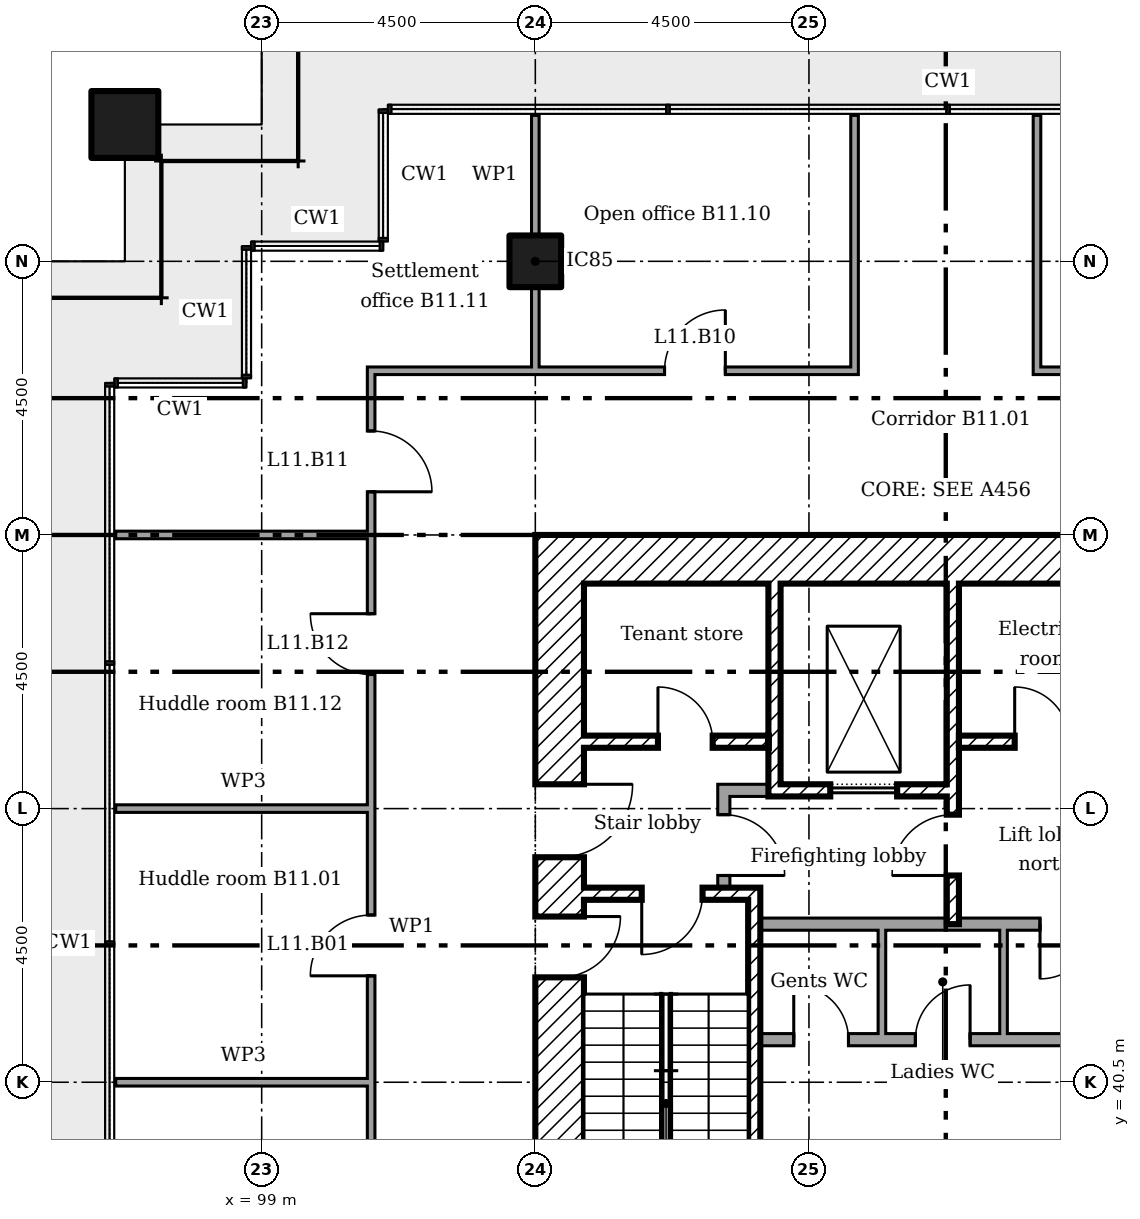
"""IFC4 building model, lengths in metres.
Left out: names, types, materials, properties, quantities, classifications, styles, units other than length and angle.
Written with IfcOpenShell. Run it as: python <this file> out.ifc"""

import sys

from ifc_helpers import new_model, si_unit, direction, frame, frame_2d, origin, origin_2d, place, context, subcontext, project, spatial, rectangle, extrude, element, fill, save


model = new_model("IFC4")
c1 = context("Model", 3, precision=1e-05, world=origin(), true_north=direction((0.0, 1.0)))
c2 = subcontext(c1, "Body", "Model", "MODEL_VIEW")
j1 = project(units=[si_unit("LENGTHUNIT", "METRE"), si_unit("PLANEANGLEUNIT", "RADIAN")], contexts=[c1])
p1 = place(None, origin())
s1 = spatial("IfcSite", under=j1, at=p1, CompositionType="ELEMENT")
p2 = place(p1, origin())
s2 = spatial("IfcBuilding", under=s1, at=p2, CompositionType="ELEMENT")
p3 = place(p2, frame((0.0, 0.0, 51.0)))
s3 = spatial("IfcBuildingStorey", under=s2, at=p3, CompositionType="ELEMENT", Elevation=51.0)
p4 = place(p3, frame((96.75, 56.25, 0.0)))
e1 = element("IfcColumn", 1, at=p4, inside=s3, PredefinedType="COLUMN", context=c2, shape_type="SweptSolid", body=[
    extrude(rectangle(XDim=1.1, YDim=1.1, at=origin_2d()), origin(), (0.0, 0.0, 1.0), 3.6),
])
p5 = place(p3, frame((103.5, 54.0, 0.0)))
e2 = element("IfcColumn", 2, at=p5, inside=s3, PredefinedType="COLUMN", context=c2, shape_type="SweptSolid", body=[
    extrude(rectangle(XDim=0.85, YDim=0.85, at=origin_2d()), origin(), (0.0, 0.0, 1.0), 3.6),
])
p6 = place(p3, frame((104.3, 49.1, 0.0)))
e3 = element("IfcWall", 3, at=p6, inside=s3, PredefinedType="SHEAR", context=c2, shape_type="SweptSolid", body=[
    extrude(rectangle(XDim=11.9, YDim=0.8, at=frame_2d((5.95, 0.0))), origin(), (0.0, 0.0, 1.0), 3.35),
])
p7 = place(p3, frame((103.9, 36.0, 0.0), z_axis=(0.0, 0.0, 1.0), x_axis=(0.0, 1.0, 0.0)))
e4 = element("IfcWall", 4, at=p7, inside=s3, PredefinedType="SHEAR", context=c2, shape_type="SweptSolid", body=[
    extrude(rectangle(XDim=13.5, YDim=0.8, at=frame_2d((6.75, 0.0))), origin(), (0.0, 0.0, 1.0), 3.35),
])
p8 = place(p7, frame((8.2, 0.0, 0.0)))
e5 = element("IfcOpeningElement", 5, at=p8, cuts=e4, PredefinedType="OPENING", context=c2, shape_type="SweptSolid", body=[
    extrude(rectangle(XDim=1.2, YDim=2.1, at=frame_2d((0.6, 1.05))), frame((0.0, 0.41, 0.0), z_axis=(0.0, -1.0, 0.0), x_axis=(1.0, 0.0, 0.0)), (0.0, 0.0, 1.0), 0.82),
])
p9 = place(p7, frame((6.225, 0.0, 0.0)))
e6 = element("IfcOpeningElement", 6, at=p9, cuts=e4, PredefinedType="OPENING", context=c2, shape_type="SweptSolid", body=[
    extrude(rectangle(XDim=1.0, YDim=2.1, at=frame_2d((0.5, 1.05))), frame((0.0, 0.41, 0.0), z_axis=(0.0, -1.0, 0.0), x_axis=(1.0, 0.0, 0.0)), (0.0, 0.0, 1.0), 0.82),
])
p10 = place(p3, frame((107.433, 48.7, 0.0), z_axis=(0.0, 0.0, 1.0), x_axis=(0.0, -1.0, 0.0)))
e7 = element("IfcWall", 7, at=p10, inside=s3, PredefinedType="SHEAR", context=c2, shape_type="SweptSolid", body=[
    extrude(rectangle(XDim=3.5, YDim=0.2, at=frame_2d((1.75, 0.0))), origin(), (0.0, 0.0, 1.0), 3.35),
])
p11 = place(p3, frame((110.367, 48.7, 0.0), z_axis=(0.0, 0.0, 1.0), x_axis=(0.0, -1.0, 0.0)))
e8 = element("IfcWall", 8, at=p11, inside=s3, PredefinedType="SHEAR", context=c2, shape_type="SweptSolid", body=[
    extrude(rectangle(XDim=5.6, YDim=0.2, at=frame_2d((2.8, 0.0))), origin(), (0.0, 0.0, 1.0), 3.35),
])
p12 = place(p11, frame((3.8, 0.0, 0.0)))
e9 = element("IfcOpeningElement", 9, at=p12, cuts=e8, PredefinedType="OPENING", context=c2, shape_type="SweptSolid", body=[
    extrude(rectangle(XDim=1.0, YDim=2.1, at=frame_2d((0.5, 1.05))), frame((0.0, 0.11, 0.0), z_axis=(0.0, -1.0, 0.0), x_axis=(1.0, 0.0, 0.0)), (0.0, 0.0, 1.0), 0.22),
])
p13 = place(p3, frame((106.5, 45.3, 0.0)))
e10 = element("IfcWall", 10, at=p13, inside=s3, PredefinedType="PARTITIONING", context=c2, shape_type="SweptSolid", body=[
    extrude(rectangle(XDim=0.833, YDim=0.2, at=frame_2d((0.417, 0.0))), origin(), (0.0, 0.0, 1.0), 3.35),
])
p14 = place(p3, frame((106.6, 43.7, 0.0), z_axis=(0.0, 0.0, 1.0), x_axis=(0.0, 1.0, 0.0)))
e11 = element("IfcWall", 11, at=p14, inside=s3, PredefinedType="PARTITIONING", context=c2, shape_type="SweptSolid", body=[
    extrude(rectangle(XDim=1.5, YDim=0.2, at=frame_2d((0.75, 0.0))), origin(), (0.0, 0.0, 1.0), 3.35),
])
p15 = place(p14, frame((0.2, 0.0, 0.0)))
e12 = element("IfcOpeningElement", 12, at=p15, cuts=e11, PredefinedType="OPENING", context=c2, shape_type="SweptSolid", body=[
    extrude(rectangle(XDim=1.0, YDim=2.1, at=frame_2d((0.5, 1.05))), frame((0.0, 0.11, 0.0), z_axis=(0.0, -1.0, 0.0), x_axis=(1.0, 0.0, 0.0)), (0.0, 0.0, 1.0), 0.22),
])
p16 = place(p3, frame((104.3, 46.1, 0.0)))
e13 = element("IfcWall", 13, at=p16, inside=s3, PredefinedType="SHEAR", context=c2, shape_type="SweptSolid", body=[
    extrude(rectangle(XDim=3.033, YDim=0.2, at=frame_2d((1.517, 0.0))), origin(), (0.0, 0.0, 1.0), 3.35),
])
p17 = place(p16, frame((1.217, 0.0, 0.0)))
e14 = element("IfcOpeningElement", 14, at=p17, cuts=e13, PredefinedType="OPENING", context=c2, shape_type="SweptSolid", body=[
    extrude(rectangle(XDim=0.9, YDim=2.1, at=frame_2d((0.45, 1.05))), frame((0.0, 0.11, 0.0), z_axis=(0.0, -1.0, 0.0), x_axis=(1.0, 0.0, 0.0)), (0.0, 0.0, 1.0), 0.22),
])
p18 = place(p3, frame((110.467, 46.1, 0.0)))
e15 = element("IfcWall", 15, at=p18, inside=s3, PredefinedType="SHEAR", context=c2, shape_type="SweptSolid", body=[
    extrude(rectangle(XDim=2.833, YDim=0.2, at=frame_2d((1.417, 0.0))), origin(), (0.0, 0.0, 1.0), 3.35),
])
p19 = place(p18, frame((0.917, 0.0, 0.0)))
e16 = element("IfcOpeningElement", 16, at=p19, cuts=e15, PredefinedType="OPENING", context=c2, shape_type="SweptSolid", body=[
    extrude(rectangle(XDim=0.9, YDim=2.1, at=frame_2d((0.45, 1.05))), frame((0.0, 0.11, 0.0), z_axis=(0.0, -1.0, 0.0), x_axis=(1.0, 0.0, 0.0)), (0.0, 0.0, 1.0), 0.22),
])
p20 = place(p3, frame((107.533, 45.3, 0.0)))
e17 = element("IfcWall", 17, at=p20, inside=s3, PredefinedType="SHEAR", context=c2, shape_type="SweptSolid", body=[
    extrude(rectangle(XDim=2.733, YDim=0.2, at=frame_2d((1.367, 0.0))), origin(), (0.0, 0.0, 1.0), 3.35),
])
p21 = place(p20, frame((0.817, 0.0, 0.0)))
e18 = element("IfcOpeningElement", 18, at=p21, cuts=e17, PredefinedType="OPENING", context=c2, shape_type="SweptSolid", body=[
    extrude(rectangle(XDim=1.1, YDim=2.1, at=frame_2d((0.55, 1.05))), frame((0.0, 0.11, 0.0), z_axis=(0.0, -1.0, 0.0), x_axis=(1.0, 0.0, 0.0)), (0.0, 0.0, 1.0), 0.22),
])
p22 = place(p3, frame((107.1, 36.8, 0.0), z_axis=(0.0, 0.0, 1.0), x_axis=(0.0, 1.0, 0.0)))
e19 = element("IfcWall", 19, at=p22, inside=s3, PredefinedType="SHEAR", context=c2, shape_type="SweptSolid", body=[
    extrude(rectangle(XDim=6.9, YDim=0.2, at=frame_2d((3.45, 0.0))), origin(), (0.0, 0.0, 1.0), 3.35),
])
p23 = place(p3, frame((104.3, 43.6, 0.0)))
e20 = element("IfcWall", 20, at=p23, inside=s3, PredefinedType="SHEAR", context=c2, shape_type="SweptSolid", body=[
    extrude(rectangle(XDim=2.7, YDim=0.2, at=frame_2d((1.35, 0.0))), origin(), (0.0, 0.0, 1.0), 3.35),
])
p24 = place(p23, frame((0.95, 0.0, 0.0)))
e21 = element("IfcOpeningElement", 21, at=p24, cuts=e20, PredefinedType="OPENING", context=c2, shape_type="SweptSolid", body=[
    extrude(rectangle(XDim=1.0, YDim=2.1, at=frame_2d((0.5, 1.05))), frame((0.0, 0.11, 0.0), z_axis=(0.0, -1.0, 0.0), x_axis=(1.0, 0.0, 0.0)), (0.0, 0.0, 1.0), 0.22),
])
p25 = place(p3, frame((107.2, 43.1, 0.0)))
e22 = element("IfcWall", 22, at=p25, inside=s3, PredefinedType="PARTITIONING", context=c2, shape_type="SweptSolid", body=[
    extrude(rectangle(XDim=6.1, YDim=0.2, at=frame_2d((3.05, 0.0))), origin(), (0.0, 0.0, 1.0), 3.35),
])
p26 = place(p25, frame((4.6, 0.0, 0.0)))
e23 = element("IfcOpeningElement", 23, at=p26, cuts=e22, PredefinedType="OPENING", context=c2, shape_type="SweptSolid", body=[
    extrude(rectangle(XDim=0.9, YDim=2.1, at=frame_2d((0.45, 1.05))), frame((0.0, 0.11, 0.0), z_axis=(0.0, -1.0, 0.0), x_axis=(1.0, 0.0, 0.0)), (0.0, 0.0, 1.0), 0.22),
])
p27 = place(p3, frame((107.2, 41.2, 0.0)))
e24 = element("IfcWall", 24, at=p27, inside=s3, PredefinedType="PARTITIONING", context=c2, shape_type="SweptSolid", body=[
    extrude(rectangle(XDim=6.1, YDim=0.2, at=frame_2d((3.05, 0.0))), origin(), (0.0, 0.0, 1.0), 3.35),
])
p28 = place(p27, frame((0.55, 0.0, 0.0)))
e25 = element("IfcOpeningElement", 25, at=p28, cuts=e24, PredefinedType="OPENING", context=c2, shape_type="SweptSolid", body=[
    extrude(rectangle(XDim=0.9, YDim=2.1, at=frame_2d((0.45, 1.05))), frame((0.0, 0.11, 0.0), z_axis=(0.0, -1.0, 0.0), x_axis=(1.0, 0.0, 0.0)), (0.0, 0.0, 1.0), 0.22),
])
p29 = place(p27, frame((2.55, 0.0, 0.0)))
e26 = element("IfcOpeningElement", 26, at=p29, cuts=e24, PredefinedType="OPENING", context=c2, shape_type="SweptSolid", body=[
    extrude(rectangle(XDim=0.9, YDim=2.1, at=frame_2d((0.45, 1.05))), frame((0.0, 0.11, 0.0), z_axis=(0.0, -1.0, 0.0), x_axis=(1.0, 0.0, 0.0)), (0.0, 0.0, 1.0), 0.22),
])
for number, where, z_axis, x_axis in (
    (27, (109.2, 41.3, 0.0), (0.0, 0.0, 1.0), (0.0, 1.0, 0.0)),
    (28, (111.2, 41.3, 0.0), (0.0, 0.0, 1.0), (0.0, 1.0, 0.0)),
):
    element("IfcWall", number, at=place(p3, frame(where, z_axis=z_axis, x_axis=x_axis)), inside=s3, PredefinedType="PARTITIONING", context=c2, shape_type="SweptSolid", body=[
        extrude(rectangle(XDim=1.7, YDim=0.125, at=frame_2d((0.85, 0.0))), origin(), (0.0, 0.0, 1.0), 3.35),
    ])
for number, where in (
    (29, (96.6, 40.5, 0.0)),
    (30, (96.6, 45.0, 0.0)),
):
    element("IfcWall", number, at=place(p3, frame(where)), inside=s3, PredefinedType="MOVABLE", context=c2, shape_type="SweptSolid", body=[
        extrude(rectangle(XDim=4.2, YDim=0.125, at=frame_2d((2.1, 0.0))), origin(), (0.0, 0.0, 1.0), 2.851),
    ])
p30 = place(p3, frame((96.6, 49.5, 0.0)))
e31 = element("IfcWall", 31, at=p30, inside=s3, PredefinedType="PARTITIONING", context=c2, shape_type="SweptSolid", body=[
    extrude(rectangle(XDim=4.2, YDim=0.125, at=frame_2d((2.1, 0.0))), origin(), (0.0, 0.0, 1.0), 2.851),
])
p31 = place(p3, frame((100.738, 52.2, 0.0)))
e32 = element("IfcWall", 32, at=p31, inside=s3, PredefinedType="PARTITIONING", context=c2, shape_type="SweptSolid", body=[
    extrude(rectangle(XDim=8.075, YDim=0.125, at=frame_2d((4.038, 0.0))), origin(), (0.0, 0.0, 1.0), 3.45),
])
p32 = place(p31, frame((4.887, 0.0, 0.0)))
e33 = element("IfcOpeningElement", 33, at=p32, cuts=e32, PredefinedType="OPENING", context=c2, shape_type="SweptSolid", body=[
    extrude(rectangle(XDim=1.0, YDim=2.1, at=frame_2d((0.5, 1.05))), frame((0.0, 0.073, 0.0), z_axis=(0.0, -1.0, 0.0), x_axis=(1.0, 0.0, 0.0)), (0.0, 0.0, 1.0), 0.145),
])
p33 = place(p3, frame((111.688, 52.2, 0.0)))
e34 = element("IfcWall", 34, at=p33, inside=s3, PredefinedType="PARTITIONING", context=c2, shape_type="SweptSolid", body=[
    extrude(rectangle(XDim=8.675, YDim=0.125, at=frame_2d((4.337, 0.0))), origin(), (0.0, 0.0, 1.0), 3.45),
])
p34 = place(p33, frame((2.773, 0.0, 0.0)))
e35 = element("IfcOpeningElement", 35, at=p34, cuts=e34, PredefinedType="OPENING", context=c2, shape_type="SweptSolid", body=[
    extrude(rectangle(XDim=1.0, YDim=2.1, at=frame_2d((0.5, 1.05))), frame((0.0, 0.073, 0.0), z_axis=(0.0, -1.0, 0.0), x_axis=(1.0, 0.0, 0.0)), (0.0, 0.0, 1.0), 0.145),
])
p35 = place(p3, frame((100.8, 33.962, 0.0), z_axis=(0.0, 0.0, 1.0), x_axis=(0.0, 1.0, 0.0)))
e36 = element("IfcWall", 36, at=p35, inside=s3, PredefinedType="PARTITIONING", context=c2, shape_type="SweptSolid", body=[
    extrude(rectangle(XDim=18.175, YDim=0.125, at=frame_2d((9.087, 0.0))), origin(), (0.0, 0.0, 1.0), 3.45),
])
p36 = place(p35, frame((8.288, 0.0, 0.0)))
e37 = element("IfcOpeningElement", 37, at=p36, cuts=e36, PredefinedType="OPENING", context=c2, shape_type="SweptSolid", body=[
    extrude(rectangle(XDim=1.0, YDim=2.1, at=frame_2d((0.5, 1.05))), frame((0.0, 0.073, 0.0), z_axis=(0.0, -1.0, 0.0), x_axis=(1.0, 0.0, 0.0)), (0.0, 0.0, 1.0), 0.145),
])
p37 = place(p35, frame((3.333, 0.0, 0.0)))
e38 = element("IfcOpeningElement", 38, at=p37, cuts=e36, PredefinedType="OPENING", context=c2, shape_type="SweptSolid", body=[
    extrude(rectangle(XDim=1.0, YDim=2.1, at=frame_2d((0.5, 1.05))), frame((0.0, 0.073, 0.0), z_axis=(0.0, -1.0, 0.0), x_axis=(1.0, 0.0, 0.0)), (0.0, 0.0, 1.0), 0.145),
])
p38 = place(p35, frame((0.522, 0.0, 0.0)))
e39 = element("IfcOpeningElement", 39, at=p38, cuts=e36, PredefinedType="OPENING", context=c2, shape_type="SweptSolid", body=[
    extrude(rectangle(XDim=1.0, YDim=2.1, at=frame_2d((0.5, 1.05))), frame((0.0, 0.073, 0.0), z_axis=(0.0, -1.0, 0.0), x_axis=(1.0, 0.0, 0.0)), (0.0, 0.0, 1.0), 0.145),
])
p39 = place(p35, frame((16.248, 0.0, 0.0)))
e40 = element("IfcOpeningElement", 40, at=p39, cuts=e36, PredefinedType="OPENING", context=c2, shape_type="SweptSolid", body=[
    extrude(rectangle(XDim=1.0, YDim=2.1, at=frame_2d((0.5, 1.05))), frame((0.0, 0.073, 0.0), z_axis=(0.0, -1.0, 0.0), x_axis=(1.0, 0.0, 0.0)), (0.0, 0.0, 1.0), 0.145),
])
p40 = place(p35, frame((13.242, 0.0, 0.0)))
e41 = element("IfcOpeningElement", 41, at=p40, cuts=e36, PredefinedType="OPENING", context=c2, shape_type="SweptSolid", body=[
    extrude(rectangle(XDim=1.0, YDim=2.1, at=frame_2d((0.5, 1.05))), frame((0.0, 0.073, 0.0), z_axis=(0.0, -1.0, 0.0), x_axis=(1.0, 0.0, 0.0)), (0.0, 0.0, 1.0), 0.145),
])
p41 = place(p3, frame((103.5, 52.2, 0.0), z_axis=(0.0, 0.0, 1.0), x_axis=(0.0, 1.0, 0.0)))
e42 = element("IfcWall", 42, at=p41, inside=s3, PredefinedType="PARTITIONING", context=c2, shape_type="SweptSolid", body=[
    extrude(rectangle(XDim=1.375, YDim=0.125, at=frame_2d((0.688, 0.0))), origin(), (0.0, 0.0, 1.0), 2.842),
])
p42 = place(p3, frame((103.5, 54.425, 0.0), z_axis=(0.0, 0.0, 1.0), x_axis=(0.0, 1.0, 0.0)))
e43 = element("IfcWall", 43, at=p42, inside=s3, PredefinedType="PARTITIONING", context=c2, shape_type="SweptSolid", body=[
    extrude(rectangle(XDim=1.975, YDim=0.125, at=frame_2d((0.987, 0.0))), origin(), (0.0, 0.0, 1.0), 2.842),
])
for number, where, z_axis, x_axis in (
    (44, (108.75, 52.262, 0.0), (0.0, 0.0, 1.0), (0.0, 1.0, 0.0)),
    (45, (111.75, 52.262, 0.0), (0.0, 0.0, 1.0), (0.0, 1.0, 0.0)),
):
    element("IfcWall", number, at=place(p3, frame(where, z_axis=z_axis, x_axis=x_axis)), inside=s3, PredefinedType="PARTITIONING", context=c2, shape_type="SweptSolid", body=[
        extrude(rectangle(XDim=4.137, YDim=0.125, at=frame_2d((2.069, 0.0))), origin(), (0.0, 0.0, 1.0), 3.45),
    ])
p43 = place(p8, frame((1.2, 0.0, 0.0), x_axis=(-1.0, 0.0, 0.0)))
e46 = element("IfcDoor", 46, at=p43, inside=s3, OperationType="SINGLE_SWING_RIGHT", PredefinedType="DOOR", context=c2, shape_type="SweptSolid", body=[
    extrude(rectangle(XDim=1.2, YDim=2.1, at=frame_2d((0.6, 1.05))), frame((0.0, 0.025, 0.0), z_axis=(0.0, -1.0, 0.0), x_axis=(1.0, 0.0, 0.0)), (0.0, 0.0, 1.0), 0.05),
])
fill(e5, e46)
p44 = place(p24, frame((1.0, 0.0, 0.0), x_axis=(-1.0, 0.0, 0.0)))
e47 = element("IfcDoor", 47, at=p44, inside=s3, OperationType="SINGLE_SWING_LEFT", PredefinedType="DOOR", context=c2, shape_type="SweptSolid", body=[
    extrude(rectangle(XDim=1.0, YDim=2.1, at=frame_2d((0.5, 1.05))), frame((0.0, 0.025, 0.0), z_axis=(0.0, -1.0, 0.0), x_axis=(1.0, 0.0, 0.0)), (0.0, 0.0, 1.0), 0.05),
])
fill(e21, e47)
p45 = place(p9, frame((1.0, 0.0, 0.0), x_axis=(-1.0, 0.0, 0.0)))
e48 = element("IfcDoor", 48, at=p45, inside=s3, OperationType="SINGLE_SWING_RIGHT", PredefinedType="DOOR", context=c2, shape_type="SweptSolid", body=[
    extrude(rectangle(XDim=1.0, YDim=2.1, at=frame_2d((0.5, 1.05))), frame((0.0, 0.025, 0.0), z_axis=(0.0, -1.0, 0.0), x_axis=(1.0, 0.0, 0.0)), (0.0, 0.0, 1.0), 0.05),
])
fill(e6, e48)
p46 = place(p12, frame((1.0, 0.0, 0.0), x_axis=(-1.0, 0.0, 0.0)))
e49 = element("IfcDoor", 49, at=p46, inside=s3, OperationType="SINGLE_SWING_RIGHT", PredefinedType="DOOR", context=c2, shape_type="SweptSolid", body=[
    extrude(rectangle(XDim=1.0, YDim=2.1, at=frame_2d((0.5, 1.05))), frame((0.0, 0.025, 0.0), z_axis=(0.0, -1.0, 0.0), x_axis=(1.0, 0.0, 0.0)), (0.0, 0.0, 1.0), 0.05),
])
fill(e9, e49)
p47 = place(p15, frame((1.0, 0.0, 0.0), x_axis=(-1.0, 0.0, 0.0)))
e50 = element("IfcDoor", 50, at=p47, inside=s3, OperationType="SINGLE_SWING_LEFT", PredefinedType="DOOR", context=c2, shape_type="SweptSolid", body=[
    extrude(rectangle(XDim=1.0, YDim=2.1, at=frame_2d((0.5, 1.05))), frame((0.0, 0.025, 0.0), z_axis=(0.0, -1.0, 0.0), x_axis=(1.0, 0.0, 0.0)), (0.0, 0.0, 1.0), 0.05),
])
fill(e12, e50)
p48 = place(p17, origin())
e51 = element("IfcDoor", 51, at=p48, inside=s3, OperationType="SINGLE_SWING_RIGHT", PredefinedType="DOOR", context=c2, shape_type="SweptSolid", body=[
    extrude(rectangle(XDim=0.9, YDim=2.1, at=frame_2d((0.45, 1.05))), frame((0.0, 0.025, 0.0), z_axis=(0.0, -1.0, 0.0), x_axis=(1.0, 0.0, 0.0)), (0.0, 0.0, 1.0), 0.05),
])
fill(e14, e51)
p49 = place(p19, origin())
e52 = element("IfcDoor", 52, at=p49, inside=s3, OperationType="SINGLE_SWING_RIGHT", PredefinedType="DOOR", context=c2, shape_type="SweptSolid", body=[
    extrude(rectangle(XDim=0.9, YDim=2.1, at=frame_2d((0.45, 1.05))), frame((0.0, 0.025, 0.0), z_axis=(0.0, -1.0, 0.0), x_axis=(1.0, 0.0, 0.0)), (0.0, 0.0, 1.0), 0.05),
])
fill(e16, e52)
p50 = place(p28, origin())
e53 = element("IfcDoor", 53, at=p50, inside=s3, OperationType="SINGLE_SWING_RIGHT", PredefinedType="DOOR", context=c2, shape_type="SweptSolid", body=[
    extrude(rectangle(XDim=0.9, YDim=2.1, at=frame_2d((0.45, 1.05))), frame((0.0, 0.025, 0.0), z_axis=(0.0, -1.0, 0.0), x_axis=(1.0, 0.0, 0.0)), (0.0, 0.0, 1.0), 0.05),
])
fill(e25, e53)
p51 = place(p29, origin())
e54 = element("IfcDoor", 54, at=p51, inside=s3, OperationType="SINGLE_SWING_LEFT", PredefinedType="DOOR", context=c2, shape_type="SweptSolid", body=[
    extrude(rectangle(XDim=0.9, YDim=2.1, at=frame_2d((0.45, 1.05))), frame((0.0, 0.025, 0.0), z_axis=(0.0, -1.0, 0.0), x_axis=(1.0, 0.0, 0.0)), (0.0, 0.0, 1.0), 0.05),
])
fill(e26, e54)
p52 = place(p26, frame((0.9, 0.0, 0.0), x_axis=(-1.0, 0.0, 0.0)))
e55 = element("IfcDoor", 55, at=p52, inside=s3, OperationType="SINGLE_SWING_LEFT", PredefinedType="DOOR", context=c2, shape_type="SweptSolid", body=[
    extrude(rectangle(XDim=0.9, YDim=2.1, at=frame_2d((0.45, 1.05))), frame((0.0, 0.025, 0.0), z_axis=(0.0, -1.0, 0.0), x_axis=(1.0, 0.0, 0.0)), (0.0, 0.0, 1.0), 0.05),
])
fill(e23, e55)
p53 = place(p21, origin())
e56 = element("IfcDoor", 56, at=p53, inside=s3, OperationType="SLIDING_TO_LEFT", PredefinedType="DOOR", context=c2, shape_type="SweptSolid", body=[
    extrude(rectangle(XDim=1.1, YDim=2.1, at=frame_2d((0.55, 1.05))), frame((0.0, 0.025, 0.0), z_axis=(0.0, -1.0, 0.0), x_axis=(1.0, 0.0, 0.0)), (0.0, 0.0, 1.0), 0.05),
])
fill(e18, e56)
p54 = place(p36, origin())
e57 = element("IfcDoor", 57, at=p54, inside=s3, OperationType="SINGLE_SWING_RIGHT", PredefinedType="DOOR", context=c2, shape_type="SweptSolid", body=[
    extrude(rectangle(XDim=1.0, YDim=2.1, at=frame_2d((0.5, 1.05))), frame((0.0, 0.025, 0.0), z_axis=(0.0, -1.0, 0.0), x_axis=(1.0, 0.0, 0.0)), (0.0, 0.0, 1.0), 0.05),
])
fill(e37, e57)
p55 = place(p32, origin())
e58 = element("IfcDoor", 58, at=p55, inside=s3, OperationType="SINGLE_SWING_LEFT", PredefinedType="DOOR", context=c2, shape_type="SweptSolid", body=[
    extrude(rectangle(XDim=1.0, YDim=2.1, at=frame_2d((0.5, 1.05))), frame((0.0, 0.025, 0.0), z_axis=(0.0, -1.0, 0.0), x_axis=(1.0, 0.0, 0.0)), (0.0, 0.0, 1.0), 0.05),
])
fill(e33, e58)
p56 = place(p39, frame((1.0, 0.0, 0.0), x_axis=(-1.0, 0.0, 0.0)))
e59 = element("IfcDoor", 59, at=p56, inside=s3, OperationType="SINGLE_SWING_LEFT", PredefinedType="DOOR", context=c2, shape_type="SweptSolid", body=[
    extrude(rectangle(XDim=1.0, YDim=2.1, at=frame_2d((0.5, 1.05))), frame((0.0, 0.025, 0.0), z_axis=(0.0, -1.0, 0.0), x_axis=(1.0, 0.0, 0.0)), (0.0, 0.0, 1.0), 0.05),
])
fill(e40, e59)
p57 = place(p40, origin())
e60 = element("IfcDoor", 60, at=p57, inside=s3, OperationType="SINGLE_SWING_LEFT", PredefinedType="DOOR", context=c2, shape_type="SweptSolid", body=[
    extrude(rectangle(XDim=1.0, YDim=2.1, at=frame_2d((0.5, 1.05))), frame((0.0, 0.025, 0.0), z_axis=(0.0, -1.0, 0.0), x_axis=(1.0, 0.0, 0.0)), (0.0, 0.0, 1.0), 0.05),
])
fill(e41, e60)
save(model, sys.argv[1])
